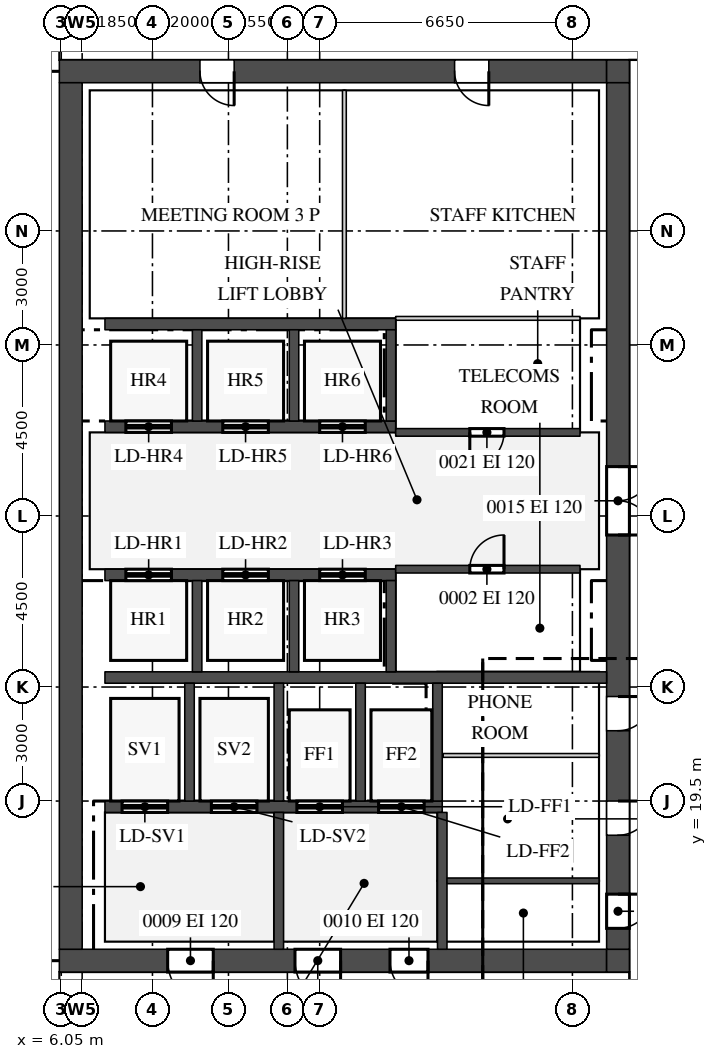
"""IFC4 building model, lengths in metres.
Left out: names, types, materials, properties, quantities, classifications, styles, units other than length and angle.
Written with IfcOpenShell. Run it as: python <this file> out.ifc"""

import sys

from ifc_helpers import new_model, si_unit, direction, frame, frame_2d, origin, place, context, subcontext, project, spatial, rectangle, extrude, source, transform, mapped, element, fill, save


model = new_model("IFC4")
c1 = context("Model", 3, precision=1e-05, world=origin(), true_north=direction((0.0, 1.0)))
c2 = subcontext(c1, "Body", "Model", "MODEL_VIEW")
j1 = project(units=[si_unit("LENGTHUNIT", "METRE"), si_unit("PLANEANGLEUNIT", "RADIAN")], contexts=[c1])
p1 = place(None, origin())
s1 = spatial("IfcSite", under=j1, at=p1, CompositionType="ELEMENT")
p2 = place(p1, origin())
s2 = spatial("IfcBuilding", under=s1, at=p2, CompositionType="ELEMENT")
p3 = place(p2, frame((0.0, 0.0, 306.2)))
s3 = spatial("IfcBuildingStorey", under=s2, at=p3, CompositionType="ELEMENT", Elevation=306.2)
m1 = source(origin(), c2, "Body", "SweptSolid", [
    extrude(rectangle(XDim=14.4, YDim=0.6, at=frame_2d((7.2, 0.0))), origin(), (0.0, 0.0, 1.0), 3.75),
])
p4 = place(p3, frame((6.0, 38.7, 0.0), z_axis=(0.0, 0.0, 1.0), x_axis=(1.0, 0.0, 0.0)))
e1 = element("IfcWall", 1, at=p4, inside=s3, PredefinedType="SHEAR", context=c2, shape_type="MappedRepresentation", body=[
    mapped(m1, transform((0.0, 0.0, 0.0))),
])
m2 = source(origin(), c2, "Body", "SweptSolid", [
    extrude(rectangle(XDim=0.9, YDim=2.1, at=frame_2d((0.45, 1.05))), frame((0.0, 0.31, 0.0), z_axis=(0.0, -1.0, 0.0), x_axis=(1.0, 0.0, 0.0)), (0.0, 0.0, 1.0), 0.62),
])
p5 = place(p4, frame((3.7, 0.0, 0.0)))
e2 = element("IfcOpeningElement", 2, at=p5, cuts=e1, PredefinedType="OPENING", context=c2, shape_type="MappedRepresentation", body=[
    mapped(m2, transform((0.0, 0.0, 0.0))),
])
p6 = place(p4, frame((10.4, 0.0, 0.0)))
e3 = element("IfcOpeningElement", 3, at=p6, cuts=e1, PredefinedType="OPENING", context=c2, shape_type="MappedRepresentation", body=[
    mapped(m2, transform((0.0, 0.0, 0.0))),
])
m3 = source(origin(), c2, "Body", "SweptSolid", [
    extrude(rectangle(XDim=0.6, YDim=0.6, at=frame_2d((0.3, 0.0))), origin(), (0.0, 0.0, 1.0), 3.75),
])
p7 = place(p3, frame((20.4, 38.7, 0.0), z_axis=(0.0, 0.0, 1.0), x_axis=(1.0, 0.0, 0.0)))
e4 = element("IfcWall", 4, at=p7, inside=s3, PredefinedType="SHEAR", context=c2, shape_type="MappedRepresentation", body=[
    mapped(m3, transform((0.0, 0.0, 0.0))),
])
p8 = place(p3, frame((6.0, 15.3, 0.0), z_axis=(0.0, 0.0, 1.0), x_axis=(1.0, 0.0, 0.0)))
e5 = element("IfcWall", 5, at=p8, inside=s3, PredefinedType="SHEAR", context=c2, shape_type="MappedRepresentation", body=[
    mapped(m1, transform((0.0, 0.0, 0.0))),
])
m4 = source(origin(), c2, "Body", "SweptSolid", [
    extrude(rectangle(XDim=1.2, YDim=2.1, at=frame_2d((0.6, 1.05))), frame((0.0, 0.31, 0.0), z_axis=(0.0, -1.0, 0.0), x_axis=(1.0, 0.0, 0.0)), (0.0, 0.0, 1.0), 0.62),
])
p9 = place(p8, frame((6.2, 0.0, 0.0)))
e6 = element("IfcOpeningElement", 6, at=p9, cuts=e5, PredefinedType="OPENING", context=c2, shape_type="MappedRepresentation", body=[
    mapped(m4, transform((0.0, 0.0, 0.0))),
])
p10 = place(p8, frame((2.85, 0.0, 0.0)))
e7 = element("IfcOpeningElement", 7, at=p10, cuts=e5, PredefinedType="OPENING", context=c2, shape_type="MappedRepresentation", body=[
    mapped(m4, transform((0.0, 0.0, 0.0))),
])
m5 = source(origin(), c2, "Body", "SweptSolid", [
    extrude(rectangle(XDim=1.0, YDim=2.1, at=frame_2d((0.5, 1.05))), frame((0.0, 0.31, 0.0), z_axis=(0.0, -1.0, 0.0), x_axis=(1.0, 0.0, 0.0)), (0.0, 0.0, 1.0), 0.62),
])
p11 = place(p8, frame((8.7, 0.0, 0.0)))
e8 = element("IfcOpeningElement", 8, at=p11, cuts=e5, PredefinedType="OPENING", context=c2, shape_type="MappedRepresentation", body=[
    mapped(m5, transform((0.0, 0.0, 0.0))),
])
p12 = place(p3, frame((20.4, 15.3, 0.0), z_axis=(0.0, 0.0, 1.0), x_axis=(1.0, 0.0, 0.0)))
e9 = element("IfcWall", 9, at=p12, inside=s3, PredefinedType="SHEAR", context=c2, shape_type="MappedRepresentation", body=[
    mapped(m3, transform((0.0, 0.0, 0.0))),
])
m6 = source(origin(), c2, "Body", "SweptSolid", [
    extrude(rectangle(XDim=22.8, YDim=0.6, at=frame_2d((11.4, 0.0))), origin(), (0.0, 0.0, 1.0), 3.75),
])
p13 = place(p3, frame((20.7, 15.6, 0.0), z_axis=(0.0, 0.0, 1.0), x_axis=(0.0, 1.0, 0.0)))
e10 = element("IfcWall", 10, at=p13, inside=s3, PredefinedType="SHEAR", context=c2, shape_type="MappedRepresentation", body=[
    mapped(m6, transform((0.0, 0.0, 0.0))),
])
m7 = source(origin(), c2, "Body", "SweptSolid", [
    extrude(rectangle(XDim=1.8, YDim=2.1, at=frame_2d((0.9, 1.05))), frame((0.0, 0.31, 0.0), z_axis=(0.0, -1.0, 0.0), x_axis=(1.0, 0.0, 0.0)), (0.0, 0.0, 1.0), 0.62),
])
p14 = place(p13, frame((10.9, 0.0, 0.0)))
e11 = element("IfcOpeningElement", 11, at=p14, cuts=e10, PredefinedType="OPENING", context=c2, shape_type="MappedRepresentation", body=[
    mapped(m7, transform((0.0, 0.0, 0.0))),
])
p15 = place(p13, frame((0.55, 0.0, 0.0)))
e12 = element("IfcOpeningElement", 12, at=p15, cuts=e10, PredefinedType="OPENING", context=c2, shape_type="MappedRepresentation", body=[
    mapped(m2, transform((0.0, 0.0, 0.0))),
])
p16 = place(p13, frame((3.0, 0.0, 0.0)))
e13 = element("IfcOpeningElement", 13, at=p16, cuts=e10, PredefinedType="OPENING", context=c2, shape_type="MappedRepresentation", body=[
    mapped(m2, transform((0.0, 0.0, 0.0))),
])
p17 = place(p13, frame((5.75, 0.0, 0.0)))
e14 = element("IfcOpeningElement", 14, at=p17, cuts=e10, PredefinedType="OPENING", context=c2, shape_type="MappedRepresentation", body=[
    mapped(m2, transform((0.0, 0.0, 0.0))),
])
p18 = place(p3, frame((6.3, 15.6, 0.0), z_axis=(0.0, 0.0, 1.0), x_axis=(0.0, 1.0, 0.0)))
e15 = element("IfcWall", 15, at=p18, inside=s3, PredefinedType="SHEAR", context=c2, shape_type="MappedRepresentation", body=[
    mapped(m6, transform((0.0, 0.0, 0.0))),
])
m8 = source(origin(), c2, "Body", "SweptSolid", [
    extrude(rectangle(XDim=13.2, YDim=0.3, at=frame_2d((6.6, 0.0))), origin(), (0.0, 0.0, 1.0), 3.75),
])
p19 = place(p3, frame((7.2, 22.75, 0.0), z_axis=(0.0, 0.0, 1.0), x_axis=(1.0, 0.0, 0.0)))
e16 = element("IfcWall", 16, at=p19, inside=s3, PredefinedType="STANDARD", context=c2, shape_type="MappedRepresentation", body=[
    mapped(m8, transform((0.0, 0.0, 0.0))),
])
m9 = source(origin(), c2, "Body", "SweptSolid", [
    extrude(rectangle(XDim=8.875, YDim=0.3, at=frame_2d((4.438, 0.0))), origin(), (0.0, 0.0, 1.0), 3.75),
])
p20 = place(p3, frame((7.2, 19.35, 0.0), z_axis=(0.0, 0.0, 1.0), x_axis=(1.0, 0.0, 0.0)))
e17 = element("IfcWall", 17, at=p20, inside=s3, PredefinedType="STANDARD", context=c2, shape_type="MappedRepresentation", body=[
    mapped(m9, transform((0.0, 0.0, 0.0))),
])
m10 = source(origin(), c2, "Body", "SweptSolid", [
    extrude(rectangle(XDim=1.2, YDim=2.1, at=frame_2d((0.6, 1.05))), frame((0.0, 0.16, 0.0), z_axis=(0.0, -1.0, 0.0), x_axis=(1.0, 0.0, 0.0)), (0.0, 0.0, 1.0), 0.32),
])
p21 = place(p20, frame((0.45, 0.0, 0.0)))
e18 = element("IfcOpeningElement", 18, at=p21, cuts=e17, PredefinedType="OPENING", context=c2, shape_type="MappedRepresentation", body=[
    mapped(m10, transform((0.0, 0.0, 0.0))),
])
p22 = place(p20, frame((2.8, 0.0, 0.0)))
e19 = element("IfcOpeningElement", 19, at=p22, cuts=e17, PredefinedType="OPENING", context=c2, shape_type="MappedRepresentation", body=[
    mapped(m10, transform((0.0, 0.0, 0.0))),
])
p23 = place(p20, frame((5.05, 0.0, 0.0)))
e20 = element("IfcOpeningElement", 20, at=p23, cuts=e17, PredefinedType="OPENING", context=c2, shape_type="MappedRepresentation", body=[
    mapped(m10, transform((0.0, 0.0, 0.0))),
])
p24 = place(p20, frame((7.2, 0.0, 0.0)))
e21 = element("IfcOpeningElement", 21, at=p24, cuts=e17, PredefinedType="OPENING", context=c2, shape_type="MappedRepresentation", body=[
    mapped(m10, transform((0.0, 0.0, 0.0))),
])
m11 = source(origin(), c2, "Body", "SweptSolid", [
    extrude(rectangle(XDim=7.65, YDim=0.3, at=frame_2d((3.825, 0.0))), origin(), (0.0, 0.0, 1.0), 3.75),
])
p25 = place(p3, frame((7.2, 32.05, 0.0), z_axis=(0.0, 0.0, 1.0), x_axis=(1.0, 0.0, 0.0)))
e22 = element("IfcWall", 22, at=p25, inside=s3, PredefinedType="STANDARD", context=c2, shape_type="MappedRepresentation", body=[
    mapped(m11, transform((0.0, 0.0, 0.0))),
])
p26 = place(p3, frame((7.2, 29.35, 0.0), z_axis=(0.0, 0.0, 1.0), x_axis=(1.0, 0.0, 0.0)))
e23 = element("IfcWall", 23, at=p26, inside=s3, PredefinedType="STANDARD", context=c2, shape_type="MappedRepresentation", body=[
    mapped(m11, transform((0.0, 0.0, 0.0))),
])
p27 = place(p26, frame((0.55, 0.0, 0.0)))
e24 = element("IfcOpeningElement", 24, at=p27, cuts=e23, PredefinedType="OPENING", context=c2, shape_type="MappedRepresentation", body=[
    mapped(m10, transform((0.0, 0.0, 0.0))),
])
p28 = place(p26, frame((3.1, 0.0, 0.0)))
e25 = element("IfcOpeningElement", 25, at=p28, cuts=e23, PredefinedType="OPENING", context=c2, shape_type="MappedRepresentation", body=[
    mapped(m10, transform((0.0, 0.0, 0.0))),
])
p29 = place(p26, frame((5.65, 0.0, 0.0)))
e26 = element("IfcOpeningElement", 26, at=p29, cuts=e23, PredefinedType="OPENING", context=c2, shape_type="MappedRepresentation", body=[
    mapped(m10, transform((0.0, 0.0, 0.0))),
])
p30 = place(p3, frame((7.2, 25.45, 0.0), z_axis=(0.0, 0.0, 1.0), x_axis=(1.0, 0.0, 0.0)))
e27 = element("IfcWall", 27, at=p30, inside=s3, PredefinedType="STANDARD", context=c2, shape_type="MappedRepresentation", body=[
    mapped(m11, transform((0.0, 0.0, 0.0))),
])
p31 = place(p30, frame((0.55, 0.0, 0.0)))
e28 = element("IfcOpeningElement", 28, at=p31, cuts=e27, PredefinedType="OPENING", context=c2, shape_type="MappedRepresentation", body=[
    mapped(m10, transform((0.0, 0.0, 0.0))),
])
p32 = place(p30, frame((3.1, 0.0, 0.0)))
e29 = element("IfcOpeningElement", 29, at=p32, cuts=e27, PredefinedType="OPENING", context=c2, shape_type="MappedRepresentation", body=[
    mapped(m10, transform((0.0, 0.0, 0.0))),
])
p33 = place(p30, frame((5.65, 0.0, 0.0)))
e30 = element("IfcOpeningElement", 30, at=p33, cuts=e27, PredefinedType="OPENING", context=c2, shape_type="MappedRepresentation", body=[
    mapped(m10, transform((0.0, 0.0, 0.0))),
])
m12 = source(origin(), c2, "Body", "SweptSolid", [
    extrude(rectangle(XDim=3.1, YDim=0.25, at=frame_2d((1.55, 0.0))), origin(), (0.0, 0.0, 1.0), 3.75),
])
for number, where, z_axis, x_axis in (
    (31, (9.425, 19.5, 0.0), (0.0, 0.0, 1.0), (0.0, 1.0, 0.0)),
    (32, (11.775, 19.5, 0.0), (0.0, 0.0, 1.0), (0.0, 1.0, 0.0)),
    (33, (13.925, 19.5, 0.0), (0.0, 0.0, 1.0), (0.0, 1.0, 0.0)),
    (34, (15.95, 19.5, 0.0), (0.0, 0.0, 1.0), (0.0, 1.0, 0.0)),
):
    element("IfcWall", number, at=place(p3, frame(where, z_axis=z_axis, x_axis=x_axis)), inside=s3, PredefinedType="STANDARD", context=c2, shape_type="MappedRepresentation", body=[
        mapped(m12, transform((0.0, 0.0, 0.0))),
    ])
m13 = source(origin(), c2, "Body", "SweptSolid", [
    extrude(rectangle(XDim=2.4, YDim=0.25, at=frame_2d((1.2, 0.0))), origin(), (0.0, 0.0, 1.0), 3.75),
])
for number, where, z_axis, x_axis in (
    (35, (9.625, 29.5, 0.0), (0.0, 0.0, 1.0), (0.0, 1.0, 0.0)),
    (36, (12.175, 29.5, 0.0), (0.0, 0.0, 1.0), (0.0, 1.0, 0.0)),
    (37, (14.725, 29.5, 0.0), (0.0, 0.0, 1.0), (0.0, 1.0, 0.0)),
):
    element("IfcWall", number, at=place(p3, frame(where, z_axis=z_axis, x_axis=x_axis)), inside=s3, PredefinedType="STANDARD", context=c2, shape_type="MappedRepresentation", body=[
        mapped(m13, transform((0.0, 0.0, 0.0))),
    ])
m14 = source(origin(), c2, "Body", "SweptSolid", [
    extrude(rectangle(XDim=2.4, YDim=0.25, at=frame_2d((1.2, 0.0))), origin(), (0.0, 0.0, 1.0), 3.75),
])
for number, where, z_axis, x_axis in (
    (38, (9.625, 22.9, 0.0), (0.0, 0.0, 1.0), (0.0, 1.0, 0.0)),
    (39, (12.175, 22.9, 0.0), (0.0, 0.0, 1.0), (0.0, 1.0, 0.0)),
    (40, (14.725, 22.9, 0.0), (0.0, 0.0, 1.0), (0.0, 1.0, 0.0)),
):
    element("IfcWall", number, at=place(p3, frame(where, z_axis=z_axis, x_axis=x_axis)), inside=s3, PredefinedType="STANDARD", context=c2, shape_type="MappedRepresentation", body=[
        mapped(m14, transform((0.0, 0.0, 0.0))),
    ])
m15 = source(origin(), c2, "Body", "SweptSolid", [
    extrude(rectangle(XDim=3.6, YDim=0.25, at=frame_2d((1.8, 0.0))), origin(), (0.0, 0.0, 1.0), 3.75),
])
for number, where, z_axis, x_axis in (
    (41, (16.075, 15.6, 0.0), (0.0, 0.0, 1.0), (0.0, 1.0, 0.0)),
    (42, (11.775, 15.6, 0.0), (0.0, 0.0, 1.0), (0.0, 1.0, 0.0)),
):
    element("IfcWall", number, at=place(p3, frame(where, z_axis=z_axis, x_axis=x_axis)), inside=s3, PredefinedType="STANDARD", context=c2, shape_type="MappedRepresentation", body=[
        mapped(m15, transform((0.0, 0.0, 0.0))),
    ])
m16 = source(origin(), c2, "Body", "SweptSolid", [
    extrude(rectangle(XDim=4.0, YDim=0.15, at=frame_2d((2.0, 0.0))), origin(), (0.0, 0.0, 1.0), 3.8),
])
p34 = place(p3, frame((16.2, 17.4, 0.0), z_axis=(0.0, 0.0, 1.0), x_axis=(1.0, 0.0, 0.0)))
e43 = element("IfcWall", 43, at=p34, inside=s3, PredefinedType="PARTITIONING", context=c2, shape_type="MappedRepresentation", body=[
    mapped(m16, transform((0.0, 0.0, 0.0))),
])
m17 = source(origin(), c2, "Body", "SweptSolid", [
    extrude(rectangle(XDim=4.1, YDim=0.1, at=frame_2d((2.05, 0.0))), origin(), (0.0, 0.0, 1.0), 3.8),
])
p35 = place(p3, frame((16.1, 20.7, 0.0), z_axis=(0.0, 0.0, 1.0), x_axis=(1.0, 0.0, 0.0)))
e44 = element("IfcWall", 44, at=p35, inside=s3, PredefinedType="PARTITIONING", context=c2, shape_type="MappedRepresentation", body=[
    mapped(m17, transform((0.0, 0.0, 0.0))),
])
m18 = source(origin(), c2, "Body", "SweptSolid", [
    extrude(rectangle(XDim=4.85, YDim=0.2, at=frame_2d((2.425, 0.0))), origin(), (0.0, 0.0, 1.0), 3.8),
])
p36 = place(p3, frame((14.85, 25.6, 0.0), z_axis=(0.0, 0.0, 1.0), x_axis=(1.0, 0.0, 0.0)))
e45 = element("IfcWall", 45, at=p36, inside=s3, PredefinedType="PARTITIONING", context=c2, shape_type="MappedRepresentation", body=[
    mapped(m18, transform((0.0, 0.0, 0.0))),
])
m19 = source(origin(), c2, "Body", "SweptSolid", [
    extrude(rectangle(XDim=0.9, YDim=2.1, at=frame_2d((0.45, 1.05))), frame((0.0, 0.11, 0.0), z_axis=(0.0, -1.0, 0.0), x_axis=(1.0, 0.0, 0.0)), (0.0, 0.0, 1.0), 0.22),
])
p37 = place(p36, frame((1.95, 0.0, 0.0)))
e46 = element("IfcOpeningElement", 46, at=p37, cuts=e45, PredefinedType="OPENING", context=c2, shape_type="MappedRepresentation", body=[
    mapped(m19, transform((0.0, 0.0, 0.0))),
])
p38 = place(p3, frame((14.85, 29.2, 0.0), z_axis=(0.0, 0.0, 1.0), x_axis=(1.0, 0.0, 0.0)))
e47 = element("IfcWall", 47, at=p38, inside=s3, PredefinedType="PARTITIONING", context=c2, shape_type="MappedRepresentation", body=[
    mapped(m18, transform((0.0, 0.0, 0.0))),
])
p39 = place(p38, frame((1.95, 0.0, 0.0)))
e48 = element("IfcOpeningElement", 48, at=p39, cuts=e47, PredefinedType="OPENING", context=c2, shape_type="MappedRepresentation", body=[
    mapped(m19, transform((0.0, 0.0, 0.0))),
])
m20 = source(origin(), c2, "Body", "SweptSolid", [
    extrude(rectangle(XDim=6.0, YDim=0.1, at=frame_2d((3.0, 0.0))), origin(), (0.0, 0.0, 1.0), 3.8),
])
p40 = place(p3, frame((13.5, 32.2, 0.0), z_axis=(0.0, 0.0, 1.0), x_axis=(0.0, 1.0, 0.0)))
e49 = element("IfcWall", 49, at=p40, inside=s3, PredefinedType="PARTITIONING", context=c2, shape_type="MappedRepresentation", body=[
    mapped(m20, transform((0.0, 0.0, 0.0))),
])
m21 = source(origin(), c2, "Body", "SweptSolid", [
    extrude(rectangle(XDim=4.85, YDim=0.1, at=frame_2d((2.425, 0.0))), origin(), (0.0, 0.0, 1.0), 3.8),
])
p41 = place(p3, frame((14.85, 32.2, 0.0), z_axis=(0.0, 0.0, 1.0), x_axis=(1.0, 0.0, 0.0)))
e50 = element("IfcWall", 50, at=p41, inside=s3, PredefinedType="PARTITIONING", context=c2, shape_type="MappedRepresentation", body=[
    mapped(m21, transform((0.0, 0.0, 0.0))),
])
m22 = source(origin(), c2, "Body", "SweptSolid", [
    extrude(rectangle(XDim=0.9, YDim=2.1, at=frame_2d((0.45, 1.05))), frame((0.0, 0.025, 0.0), z_axis=(0.0, -1.0, 0.0), x_axis=(1.0, 0.0, 0.0)), (0.0, 0.0, 1.0), 0.05),
])
p42 = place(p37, origin())
e51 = element("IfcDoor", 51, at=p42, inside=s3, OperationType="SINGLE_SWING_LEFT", PredefinedType="DOOR", context=c2, shape_type="MappedRepresentation", body=[
    mapped(m22, transform((0.0, 0.0, 0.0))),
])
fill(e46, e51)
p43 = place(p39, origin())
e52 = element("IfcDoor", 52, at=p43, inside=s3, OperationType="SINGLE_SWING_LEFT", PredefinedType="DOOR", context=c2, shape_type="MappedRepresentation", body=[
    mapped(m22, transform((0.0, 0.0, 0.0))),
])
fill(e48, e52)
m23 = source(origin(), c2, "Body", "SweptSolid", [
    extrude(rectangle(XDim=1.8, YDim=2.1, at=frame_2d((0.9, 1.05))), frame((0.0, 0.25, 0.0), z_axis=(0.0, -1.0, 0.0), x_axis=(1.0, 0.0, 0.0)), (0.0, 0.0, 1.0), 0.5),
])
p44 = place(p14, origin())
e53 = element("IfcDoor", 53, at=p44, inside=s3, OperationType="DOUBLE_DOOR_SINGLE_SWING", PredefinedType="DOOR", context=c2, shape_type="MappedRepresentation", body=[
    mapped(m23, transform((0.0, 0.0, 0.0))),
])
fill(e11, e53)
m24 = source(origin(), c2, "Body", "SweptSolid", [
    extrude(rectangle(XDim=0.9, YDim=2.1, at=frame_2d((0.45, 1.05))), frame((0.0, 0.25, 0.0), z_axis=(0.0, -1.0, 0.0), x_axis=(1.0, 0.0, 0.0)), (0.0, 0.0, 1.0), 0.5),
])
p45 = place(p5, origin())
e54 = element("IfcDoor", 54, at=p45, inside=s3, OperationType="SINGLE_SWING_RIGHT", PredefinedType="DOOR", context=c2, shape_type="MappedRepresentation", body=[
    mapped(m24, transform((0.0, 0.0, 0.0))),
])
fill(e2, e54)
p46 = place(p6, origin())
e55 = element("IfcDoor", 55, at=p46, inside=s3, OperationType="SINGLE_SWING_RIGHT", PredefinedType="DOOR", context=c2, shape_type="MappedRepresentation", body=[
    mapped(m24, transform((0.0, 0.0, 0.0))),
])
fill(e3, e55)
p47 = place(p15, origin())
e56 = element("IfcDoor", 56, at=p47, inside=s3, OperationType="SINGLE_SWING_RIGHT", PredefinedType="DOOR", context=c2, shape_type="MappedRepresentation", body=[
    mapped(m24, transform((0.0, 0.0, 0.0))),
])
fill(e12, e56)
p48 = place(p16, origin())
e57 = element("IfcDoor", 57, at=p48, inside=s3, OperationType="SINGLE_SWING_RIGHT", PredefinedType="DOOR", context=c2, shape_type="MappedRepresentation", body=[
    mapped(m24, transform((0.0, 0.0, 0.0))),
])
fill(e13, e57)
p49 = place(p17, origin())
e58 = element("IfcDoor", 58, at=p49, inside=s3, OperationType="SINGLE_SWING_RIGHT", PredefinedType="DOOR", context=c2, shape_type="MappedRepresentation", body=[
    mapped(m24, transform((0.0, 0.0, 0.0))),
])
fill(e14, e58)
m25 = source(origin(), c2, "Body", "SweptSolid", [
    extrude(rectangle(XDim=1.2, YDim=2.1, at=frame_2d((0.6, 1.05))), frame((0.0, 0.25, 0.0), z_axis=(0.0, -1.0, 0.0), x_axis=(1.0, 0.0, 0.0)), (0.0, 0.0, 1.0), 0.5),
])
p50 = place(p9, origin())
e59 = element("IfcDoor", 59, at=p50, inside=s3, OperationType="SINGLE_SWING_RIGHT", PredefinedType="DOOR", context=c2, shape_type="MappedRepresentation", body=[
    mapped(m25, transform((0.0, 0.0, 0.0))),
])
fill(e6, e59)
p51 = place(p10, origin())
e60 = element("IfcDoor", 60, at=p51, inside=s3, OperationType="SINGLE_SWING_RIGHT", PredefinedType="DOOR", context=c2, shape_type="MappedRepresentation", body=[
    mapped(m25, transform((0.0, 0.0, 0.0))),
])
fill(e7, e60)
m26 = source(origin(), c2, "Body", "SweptSolid", [
    extrude(rectangle(XDim=1.0, YDim=2.1, at=frame_2d((0.5, 1.05))), frame((0.0, 0.25, 0.0), z_axis=(0.0, -1.0, 0.0), x_axis=(1.0, 0.0, 0.0)), (0.0, 0.0, 1.0), 0.5),
])
p52 = place(p11, origin())
e61 = element("IfcDoor", 61, at=p52, inside=s3, OperationType="SINGLE_SWING_RIGHT", PredefinedType="DOOR", context=c2, shape_type="MappedRepresentation", body=[
    mapped(m26, transform((0.0, 0.0, 0.0))),
])
fill(e8, e61)
m27 = source(origin(), c2, "Body", "SweptSolid", [
    extrude(rectangle(XDim=1.2, YDim=2.1, at=frame_2d((0.6, 1.05))), frame((0.0, 0.025, 0.0), z_axis=(0.0, -1.0, 0.0), x_axis=(1.0, 0.0, 0.0)), (0.0, 0.0, 1.0), 0.05),
])
p53 = place(p31, origin())
e62 = element("IfcDoor", 62, at=p53, inside=s3, OperationType="DOUBLE_DOOR_SLIDING", PredefinedType="DOOR", context=c2, shape_type="MappedRepresentation", body=[
    mapped(m27, transform((0.0, 0.0, 0.0))),
])
fill(e28, e62)
p54 = place(p32, origin())
e63 = element("IfcDoor", 63, at=p54, inside=s3, OperationType="DOUBLE_DOOR_SLIDING", PredefinedType="DOOR", context=c2, shape_type="MappedRepresentation", body=[
    mapped(m27, transform((0.0, 0.0, 0.0))),
])
fill(e29, e63)
p55 = place(p33, origin())
e64 = element("IfcDoor", 64, at=p55, inside=s3, OperationType="DOUBLE_DOOR_SLIDING", PredefinedType="DOOR", context=c2, shape_type="MappedRepresentation", body=[
    mapped(m27, transform((0.0, 0.0, 0.0))),
])
fill(e30, e64)
p56 = place(p27, origin())
e65 = element("IfcDoor", 65, at=p56, inside=s3, OperationType="DOUBLE_DOOR_SLIDING", PredefinedType="DOOR", context=c2, shape_type="MappedRepresentation", body=[
    mapped(m27, transform((0.0, 0.0, 0.0))),
])
fill(e24, e65)
p57 = place(p28, origin())
e66 = element("IfcDoor", 66, at=p57, inside=s3, OperationType="DOUBLE_DOOR_SLIDING", PredefinedType="DOOR", context=c2, shape_type="MappedRepresentation", body=[
    mapped(m27, transform((0.0, 0.0, 0.0))),
])
fill(e25, e66)
p58 = place(p29, origin())
e67 = element("IfcDoor", 67, at=p58, inside=s3, OperationType="DOUBLE_DOOR_SLIDING", PredefinedType="DOOR", context=c2, shape_type="MappedRepresentation", body=[
    mapped(m27, transform((0.0, 0.0, 0.0))),
])
fill(e26, e67)
p59 = place(p21, origin())
e68 = element("IfcDoor", 68, at=p59, inside=s3, OperationType="DOUBLE_DOOR_SLIDING", PredefinedType="DOOR", context=c2, shape_type="MappedRepresentation", body=[
    mapped(m27, transform((0.0, 0.0, 0.0))),
])
fill(e18, e68)
p60 = place(p22, origin())
e69 = element("IfcDoor", 69, at=p60, inside=s3, OperationType="DOUBLE_DOOR_SLIDING", PredefinedType="DOOR", context=c2, shape_type="MappedRepresentation", body=[
    mapped(m27, transform((0.0, 0.0, 0.0))),
])
fill(e19, e69)
p61 = place(p23, origin())
e70 = element("IfcDoor", 70, at=p61, inside=s3, OperationType="DOUBLE_DOOR_SLIDING", PredefinedType="DOOR", context=c2, shape_type="MappedRepresentation", body=[
    mapped(m27, transform((0.0, 0.0, 0.0))),
])
fill(e20, e70)
p62 = place(p24, origin())
e71 = element("IfcDoor", 71, at=p62, inside=s3, OperationType="DOUBLE_DOOR_SLIDING", PredefinedType="DOOR", context=c2, shape_type="MappedRepresentation", body=[
    mapped(m27, transform((0.0, 0.0, 0.0))),
])
fill(e21, e71)
save(model, sys.argv[1])
